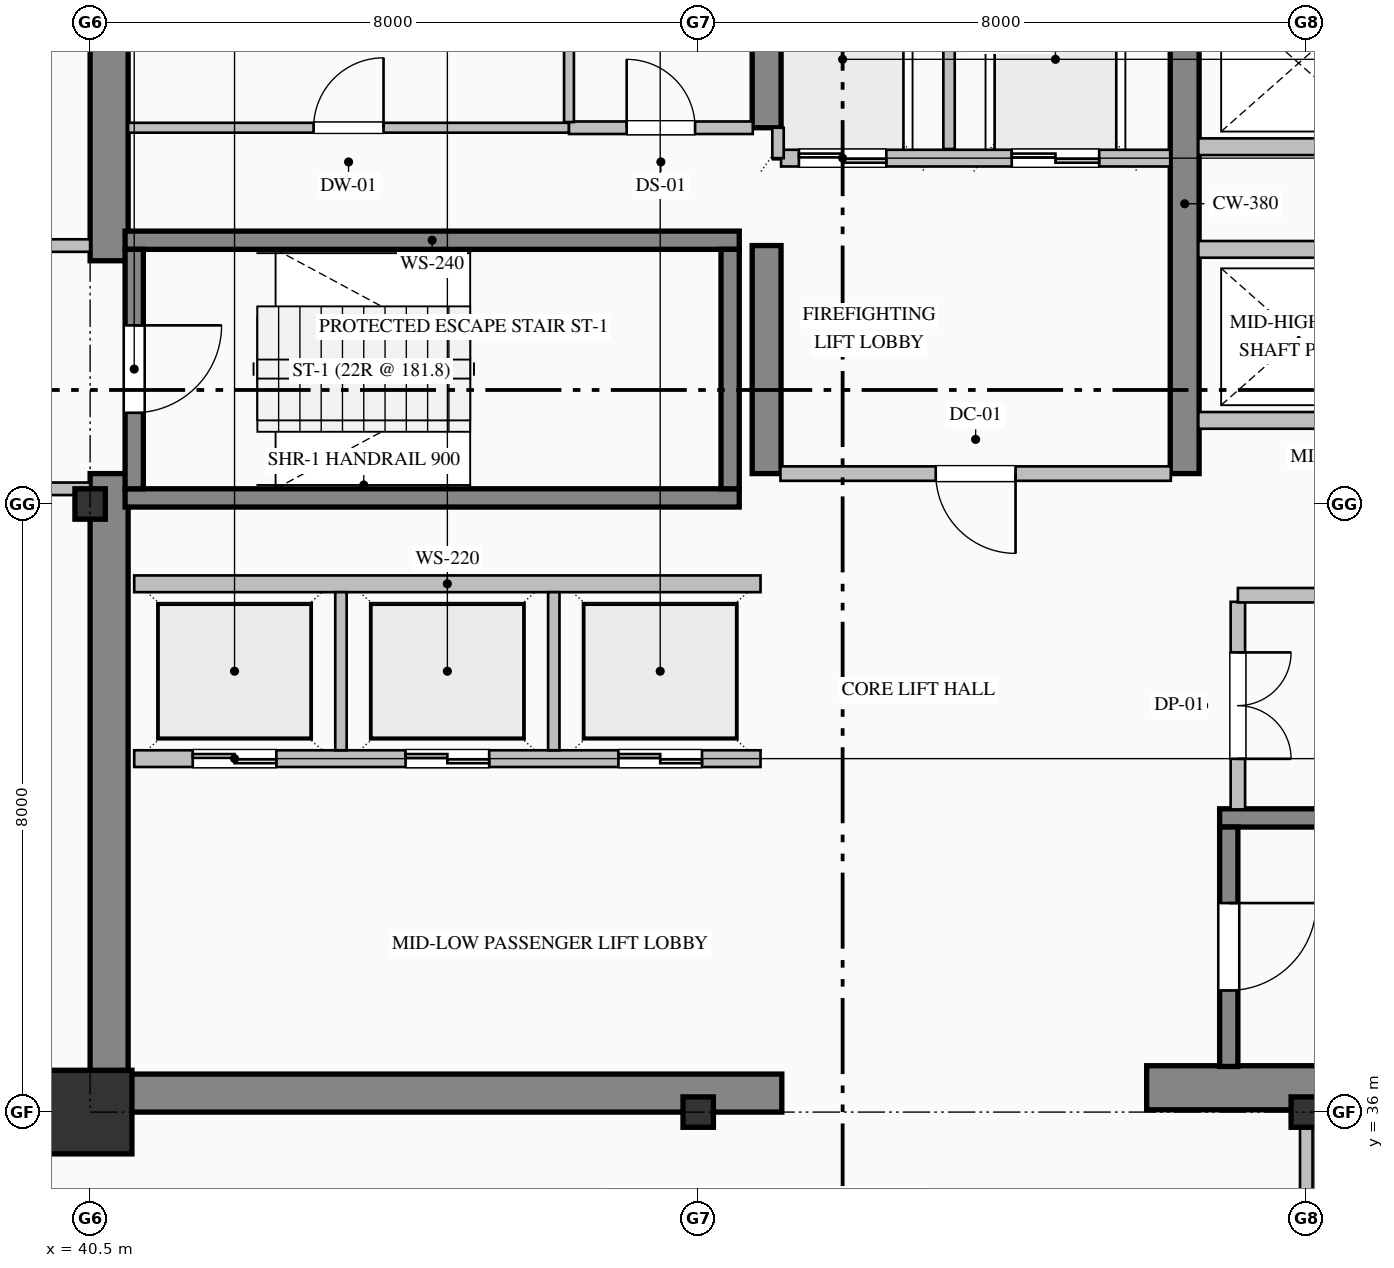
"""IFC4 building model, lengths in metres.
Left out: names, types, materials, properties, quantities, classifications, styles, units other than length and angle.
Written with IfcOpenShell. Run it as: python <this file> out.ifc"""

import sys

from ifc_helpers import new_model, si_unit, direction, frame, frame_2d, origin, origin_2d, place, context, subcontext, project, spatial, rectangle, hollow_rectangle, i_section, extrude, element, fill, save


model = new_model("IFC4")
c1 = context("Model", 3, precision=1e-05, world=origin(), true_north=direction((0.0, 1.0)))
c2 = subcontext(c1, "Body", "Model", "MODEL_VIEW")
j1 = project(units=[si_unit("LENGTHUNIT", "METRE"), si_unit("PLANEANGLEUNIT", "RADIAN")], contexts=[c1])
p1 = place(None, origin())
s1 = spatial("IfcSite", under=j1, at=p1, CompositionType="ELEMENT")
p2 = place(p1, origin())
s2 = spatial("IfcBuilding", under=s1, at=p2, CompositionType="ELEMENT")
p3 = place(p2, frame((0.0, 0.0, 127.0)))
s3 = spatial("IfcBuildingStorey", under=s2, at=p3, CompositionType="ELEMENT", Elevation=127.0)
p4 = place(p3, frame((40.75, 36.5, 0.0), z_axis=(0.0, 0.0, 1.0), x_axis=(0.0, 1.0, 0.0)))
e1 = element("IfcWall", 1, at=p4, inside=s3, PredefinedType="SHEAR", context=c2, shape_type="SweptSolid", body=[
    extrude(rectangle(XDim=7.9, YDim=0.5, at=frame_2d((3.95, 0.0))), origin(), (0.0, 0.0, 1.0), 3.765),
])
p5 = place(p3, frame((40.75, 47.2, 0.0), z_axis=(0.0, 0.0, 1.0), x_axis=(0.0, 1.0, 0.0)))
e2 = element("IfcWall", 2, at=p5, inside=s3, PredefinedType="SHEAR", context=c2, shape_type="SweptSolid", body=[
    extrude(rectangle(XDim=4.3, YDim=0.5, at=frame_2d((2.15, 0.0))), origin(), (0.0, 0.0, 1.0), 3.765),
])
p6 = place(p3, frame((40.5, 36.25, 0.0), z_axis=(0.0, 0.0, 1.0), x_axis=(1.0, 0.0, 0.0)))
e3 = element("IfcWall", 3, at=p6, inside=s3, PredefinedType="SHEAR", context=c2, shape_type="SweptSolid", body=[
    extrude(rectangle(XDim=9.1, YDim=0.5, at=frame_2d((4.55, 0.0))), origin(), (0.0, 0.0, 1.0), 3.765),
])
p7 = place(p3, frame((54.4, 36.32, 0.0), z_axis=(0.0, 0.0, 1.0), x_axis=(1.0, 0.0, 0.0)))
e4 = element("IfcWall", 4, at=p7, inside=s3, PredefinedType="SHEAR", context=c2, shape_type="SweptSolid", body=[
    extrude(rectangle(XDim=9.6, YDim=0.58, at=frame_2d((4.8, 0.0))), origin(), (0.0, 0.0, 1.0), 4.0),
])
p8 = place(p3, frame((49.4, 44.4, 0.0), z_axis=(0.0, 0.0, 1.0), x_axis=(0.0, 1.0, 0.0)))
e5 = element("IfcWall", 5, at=p8, inside=s3, PredefinedType="SHEAR", context=c2, shape_type="SweptSolid", body=[
    extrude(rectangle(XDim=3.0, YDim=0.38, at=frame_2d((1.5, 0.0))), origin(), (0.0, 0.0, 1.0), 3.765),
])
p9 = place(p3, frame((49.4, 48.95, 0.0), z_axis=(0.0, 0.0, 1.0), x_axis=(0.0, 1.0, 0.0)))
e6 = element("IfcWall", 6, at=p9, inside=s3, PredefinedType="SHEAR", context=c2, shape_type="SweptSolid", body=[
    extrude(rectangle(XDim=2.55, YDim=0.38, at=frame_2d((1.275, 0.0))), origin(), (0.0, 0.0, 1.0), 3.765),
])
p10 = place(p3, frame((54.9, 44.4, 0.0), z_axis=(0.0, 0.0, 1.0), x_axis=(0.0, 1.0, 0.0)))
e7 = element("IfcWall", 7, at=p10, inside=s3, PredefinedType="SHEAR", context=c2, shape_type="SweptSolid", body=[
    extrude(rectangle(XDim=7.1, YDim=0.38, at=frame_2d((3.55, 0.0))), origin(), (0.0, 0.0, 1.0), 3.765),
])
p11 = place(p3, frame((40.5, 36.0, 0.0), z_axis=(0.0, 0.0, 1.0), x_axis=(1.0, 0.0, 0.0)))
e8 = element("IfcColumn", 8, at=p11, inside=s3, PredefinedType="COLUMN", context=c2, shape_type="SweptSolid", body=[
    extrude(hollow_rectangle(XDim=1.1, YDim=1.1, WallThickness=0.04, at=origin_2d()), origin(), (0.0, 0.0, 1.0), 4.0),
])
for number, where, z_axis, x_axis in (
    (9, (40.5, 44.0, 0.0), (0.0, 0.0, 1.0), (1.0, 0.0, 0.0)),
    (10, (48.5, 36.0, 0.0), (0.0, 0.0, 1.0), (1.0, 0.0, 0.0)),
    (11, (56.5, 36.0, 0.0), (0.0, 0.0, 1.0), (1.0, 0.0, 0.0)),
):
    element("IfcColumn", number, at=place(p3, frame(where, z_axis=z_axis, x_axis=x_axis)), inside=s3, PredefinedType="COLUMN", context=c2, shape_type="SweptSolid", body=[
        extrude(i_section(OverallWidth=0.4, OverallDepth=0.4, WebThickness=0.013, FlangeThickness=0.021, FilletRadius=0.022, at=origin_2d()), origin(), (0.0, 0.0, 1.0), 4.0),
    ])
for number, where, z_axis, x_axis in (
    (12, (40.96, 47.47, 0.0), (0.0, 0.0, 1.0), (1.0, 0.0, 0.0)),
    (13, (49.04, 44.08, 0.0), (0.0, 0.0, 1.0), (-1.0, 0.0, 0.0)),
):
    element("IfcWall", number, at=place(p3, frame(where, z_axis=z_axis, x_axis=x_axis)), inside=s3, PredefinedType="SOLIDWALL", context=c2, shape_type="SweptSolid", body=[
        extrude(rectangle(XDim=8.08, YDim=0.24, at=frame_2d((4.04, 0.0))), origin(), (0.0, 0.0, 1.0), 4.0),
    ])
p12 = place(p3, frame((41.08, 47.35, 0.0), z_axis=(0.0, 0.0, 1.0), x_axis=(0.0, -1.0, 0.0)))
e14 = element("IfcWall", 14, at=p12, inside=s3, PredefinedType="SOLIDWALL", context=c2, shape_type="SweptSolid", body=[
    extrude(rectangle(XDim=3.15, YDim=0.24, at=frame_2d((1.575, 0.0))), origin(), (0.0, 0.0, 1.0), 4.0),
])
p13 = place(p12, frame((1.0, 0.0, 0.0)))
e15 = element("IfcOpeningElement", 15, at=p13, cuts=e14, PredefinedType="OPENING", context=c2, shape_type="SweptSolid", body=[
    extrude(rectangle(XDim=1.15, YDim=2.2, at=frame_2d((0.575, 1.1))), frame((0.0, 0.13, 0.0), z_axis=(0.0, -1.0, 0.0), x_axis=(1.0, 0.0, 0.0)), (0.0, 0.0, 1.0), 0.26),
])
p14 = place(p3, frame((48.92, 44.2, 0.0), z_axis=(0.0, 0.0, 1.0), x_axis=(0.0, 1.0, 0.0)))
e16 = element("IfcWall", 16, at=p14, inside=s3, PredefinedType="SOLIDWALL", context=c2, shape_type="SweptSolid", body=[
    extrude(rectangle(XDim=3.15, YDim=0.24, at=frame_2d((1.575, 0.0))), origin(), (0.0, 0.0, 1.0), 4.0),
])
p15 = place(p3, frame((55.36, 39.87, 0.0), z_axis=(0.0, 0.0, 1.0), x_axis=(1.0, 0.0, 0.0)))
e17 = element("IfcWall", 17, at=p15, inside=s3, PredefinedType="SOLIDWALL", context=c2, shape_type="SweptSolid", body=[
    extrude(rectangle(XDim=8.08, YDim=0.24, at=frame_2d((4.04, 0.0))), origin(), (0.0, 0.0, 1.0), 4.0),
])
p16 = place(p3, frame((55.48, 39.75, 0.0), z_axis=(0.0, 0.0, 1.0), x_axis=(0.0, -1.0, 0.0)))
e18 = element("IfcWall", 18, at=p16, inside=s3, PredefinedType="SOLIDWALL", context=c2, shape_type="SweptSolid", body=[
    extrude(rectangle(XDim=3.15, YDim=0.24, at=frame_2d((1.575, 0.0))), origin(), (0.0, 0.0, 1.0), 4.0),
])
p17 = place(p16, frame((1.0, 0.0, 0.0)))
e19 = element("IfcOpeningElement", 19, at=p17, cuts=e18, PredefinedType="OPENING", context=c2, shape_type="SweptSolid", body=[
    extrude(rectangle(XDim=1.15, YDim=2.2, at=frame_2d((0.575, 1.1))), frame((0.0, 0.13, 0.0), z_axis=(0.0, -1.0, 0.0), x_axis=(1.0, 0.0, 0.0)), (0.0, 0.0, 1.0), 0.26),
])
p18 = place(p3, frame((54.71, 48.55, 0.0), z_axis=(0.0, 0.0, 1.0), x_axis=(-1.0, 0.0, 0.0)))
e20 = element("IfcWall", 20, at=p18, inside=s3, PredefinedType="PARTITIONING", context=c2, shape_type="SweptSolid", body=[
    extrude(rectangle(XDim=5.12, YDim=0.22, at=frame_2d((2.56, 0.0))), origin(), (0.0, 0.0, 1.0), 3.765),
])
p19 = place(p18, frame((3.735, 0.0, 0.0)))
e21 = element("IfcOpeningElement", 21, at=p19, cuts=e20, PredefinedType="OPENING", context=c2, shape_type="SweptSolid", body=[
    extrude(rectangle(XDim=1.15, YDim=2.2, at=frame_2d((0.575, 1.1))), frame((0.0, 0.12, 0.0), z_axis=(0.0, -1.0, 0.0), x_axis=(1.0, 0.0, 0.0)), (0.0, 0.0, 1.0), 0.24),
])
p20 = place(p18, frame((0.935, 0.0, 0.0)))
e22 = element("IfcOpeningElement", 22, at=p20, cuts=e20, PredefinedType="OPENING", context=c2, shape_type="SweptSolid", body=[
    extrude(rectangle(XDim=1.15, YDim=2.2, at=frame_2d((0.575, 1.1))), frame((0.0, 0.12, 0.0), z_axis=(0.0, -1.0, 0.0), x_axis=(1.0, 0.0, 0.0)), (0.0, 0.0, 1.0), 0.24),
])
p21 = place(p3, frame((51.8, 48.67, 0.0), z_axis=(0.0, 0.0, 1.0), x_axis=(0.0, 1.0, 0.0)))
e23 = element("IfcWall", 23, at=p21, inside=s3, PredefinedType="PARTITIONING", context=c2, shape_type="SweptSolid", body=[
    extrude(rectangle(XDim=2.83, YDim=0.15, at=frame_2d((1.415, 0.0))), origin(), (0.0, 0.0, 1.0), 3.765),
])
p22 = place(p3, frame((49.55, 48.55, 0.0), z_axis=(0.0, 0.0, 1.0), x_axis=(0.0, 1.0, 0.0)))
e24 = element("IfcWall", 24, at=p22, inside=s3, PredefinedType="PARTITIONING", context=c2, shape_type="SweptSolid", body=[
    extrude(rectangle(XDim=0.4, YDim=0.15, at=frame_2d((0.2, 0.0))), origin(), (0.0, 0.0, 1.0), 3.765),
])
p23 = place(p3, frame((49.32, 40.65, 0.0), z_axis=(0.0, 0.0, 1.0), x_axis=(-1.0, 0.0, 0.0)))
e25 = element("IfcWall", 25, at=p23, inside=s3, PredefinedType="PARTITIONING", context=c2, shape_type="SweptSolid", body=[
    extrude(rectangle(XDim=8.24, YDim=0.22, at=frame_2d((4.12, 0.0))), origin(), (0.0, 0.0, 1.0), 3.765),
])
p24 = place(p23, frame((6.37, 0.0, 0.0)))
e26 = element("IfcOpeningElement", 26, at=p24, cuts=e25, PredefinedType="OPENING", context=c2, shape_type="SweptSolid", body=[
    extrude(rectangle(XDim=1.1, YDim=2.2, at=frame_2d((0.55, 1.1))), frame((0.0, 0.12, 0.0), z_axis=(0.0, -1.0, 0.0), x_axis=(1.0, 0.0, 0.0)), (0.0, 0.0, 1.0), 0.24),
])
p25 = place(p23, frame((3.57, 0.0, 0.0)))
e27 = element("IfcOpeningElement", 27, at=p25, cuts=e25, PredefinedType="OPENING", context=c2, shape_type="SweptSolid", body=[
    extrude(rectangle(XDim=1.1, YDim=2.2, at=frame_2d((0.55, 1.1))), frame((0.0, 0.12, 0.0), z_axis=(0.0, -1.0, 0.0), x_axis=(1.0, 0.0, 0.0)), (0.0, 0.0, 1.0), 0.24),
])
p26 = place(p23, frame((0.77, 0.0, 0.0)))
e28 = element("IfcOpeningElement", 28, at=p26, cuts=e25, PredefinedType="OPENING", context=c2, shape_type="SweptSolid", body=[
    extrude(rectangle(XDim=1.1, YDim=2.2, at=frame_2d((0.55, 1.1))), frame((0.0, 0.12, 0.0), z_axis=(0.0, -1.0, 0.0), x_axis=(1.0, 0.0, 0.0)), (0.0, 0.0, 1.0), 0.24),
])
p27 = place(p3, frame((41.08, 42.95, 0.0), z_axis=(0.0, 0.0, 1.0), x_axis=(1.0, 0.0, 0.0)))
e29 = element("IfcWall", 29, at=p27, inside=s3, PredefinedType="PARTITIONING", context=c2, shape_type="SweptSolid", body=[
    extrude(rectangle(XDim=8.24, YDim=0.22, at=frame_2d((4.12, 0.0))), origin(), (0.0, 0.0, 1.0), 3.765),
])
for number, where, z_axis, x_axis in (
    (30, (43.8, 40.76, 0.0), (0.0, 0.0, 1.0), (0.0, 1.0, 0.0)),
    (31, (46.6, 40.76, 0.0), (0.0, 0.0, 1.0), (0.0, 1.0, 0.0)),
):
    element("IfcWall", number, at=place(p3, frame(where, z_axis=z_axis, x_axis=x_axis)), inside=s3, PredefinedType="PARTITIONING", context=c2, shape_type="SweptSolid", body=[
        extrude(rectangle(XDim=2.08, YDim=0.15, at=frame_2d((1.04, 0.0))), origin(), (0.0, 0.0, 1.0), 3.765),
    ])
for number, where, z_axis, x_axis in (
    (32, (63.32, 45.1, 0.0), (0.0, 0.0, 1.0), (-1.0, 0.0, 0.0)),
    (33, (55.08, 47.35, 0.0), (0.0, 0.0, 1.0), (1.0, 0.0, 0.0)),
    (34, (63.32, 48.7, 0.0), (0.0, 0.0, 1.0), (-1.0, 0.0, 0.0)),
):
    element("IfcWall", number, at=place(p3, frame(where, z_axis=z_axis, x_axis=x_axis)), inside=s3, PredefinedType="PARTITIONING", context=c2, shape_type="SweptSolid", body=[
        extrude(rectangle(XDim=8.24, YDim=0.22, at=frame_2d((4.12, 0.0))), origin(), (0.0, 0.0, 1.0), 3.765),
    ])
p28 = place(p3, frame((37.8, 47.4, 0.0), z_axis=(0.0, 0.0, 1.0), x_axis=(1.0, 0.0, 0.0)))
e35 = element("IfcWall", 35, at=p28, inside=s3, PredefinedType="PARTITIONING", context=c2, shape_type="SweptSolid", body=[
    extrude(rectangle(XDim=2.7, YDim=0.165, at=frame_2d((1.35, 0.0))), origin(), (0.0, 0.0, 1.0), 3.765),
])
p29 = place(p28, frame((0.825, 0.0, 0.0)))
e36 = element("IfcOpeningElement", 36, at=p29, cuts=e35, PredefinedType="OPENING", context=c2, shape_type="SweptSolid", body=[
    extrude(rectangle(XDim=1.05, YDim=2.15, at=frame_2d((0.525, 1.075))), frame((0.0, 0.093, 0.0), z_axis=(0.0, -1.0, 0.0), x_axis=(1.0, 0.0, 0.0)), (0.0, 0.0, 1.0), 0.185),
])
p30 = place(p3, frame((40.5, 44.2, 0.0), z_axis=(0.0, 0.0, 1.0), x_axis=(-1.0, 0.0, 0.0)))
e37 = element("IfcWall", 37, at=p30, inside=s3, PredefinedType="PARTITIONING", context=c2, shape_type="SweptSolid", body=[
    extrude(rectangle(XDim=2.7, YDim=0.165, at=frame_2d((1.35, 0.0))), origin(), (0.0, 0.0, 1.0), 3.765),
])
p31 = place(p30, frame((0.825, 0.0, 0.0)))
e38 = element("IfcOpeningElement", 38, at=p31, cuts=e37, PredefinedType="OPENING", context=c2, shape_type="SweptSolid", body=[
    extrude(rectangle(XDim=1.05, YDim=2.15, at=frame_2d((0.525, 1.075))), frame((0.0, 0.093, 0.0), z_axis=(0.0, -1.0, 0.0), x_axis=(1.0, 0.0, 0.0)), (0.0, 0.0, 1.0), 0.185),
])
p32 = place(p3, frame((41.0, 48.95, 0.0), z_axis=(0.0, 0.0, 1.0), x_axis=(1.0, 0.0, 0.0)))
e39 = element("IfcWall", 39, at=p32, inside=s3, PredefinedType="PARTITIONING", context=c2, shape_type="SweptSolid", body=[
    extrude(rectangle(XDim=5.8, YDim=0.13, at=frame_2d((2.9, 0.0))), origin(), (0.0, 0.0, 1.0), 3.765),
])
p33 = place(p32, frame((2.44, 0.0, 0.0)))
e40 = element("IfcOpeningElement", 40, at=p33, cuts=e39, PredefinedType="OPENING", context=c2, shape_type="SweptSolid", body=[
    extrude(rectangle(XDim=0.92, YDim=2.15, at=frame_2d((0.46, 1.075))), frame((0.0, 0.075, 0.0), z_axis=(0.0, -1.0, 0.0), x_axis=(1.0, 0.0, 0.0)), (0.0, 0.0, 1.0), 0.15),
])
p34 = place(p3, frame((46.8, 48.95, 0.0), z_axis=(0.0, 0.0, 1.0), x_axis=(1.0, 0.0, 0.0)))
e41 = element("IfcWall", 41, at=p34, inside=s3, PredefinedType="PARTITIONING", context=c2, shape_type="SweptSolid", body=[
    extrude(rectangle(XDim=2.418, YDim=0.165, at=frame_2d((1.209, 0.0))), origin(), (0.0, 0.0, 1.0), 3.765),
])
p35 = place(p34, frame((0.759, 0.0, 0.0)))
e42 = element("IfcOpeningElement", 42, at=p35, cuts=e41, PredefinedType="OPENING", context=c2, shape_type="SweptSolid", body=[
    extrude(rectangle(XDim=0.9, YDim=2.15, at=frame_2d((0.45, 1.075))), frame((0.0, 0.093, 0.0), z_axis=(0.0, -1.0, 0.0), x_axis=(1.0, 0.0, 0.0)), (0.0, 0.0, 1.0), 0.185),
])
p36 = place(p3, frame((54.718, 44.4, 0.0), z_axis=(0.0, 0.0, 1.0), x_axis=(-1.0, 0.0, 0.0)))
e43 = element("IfcWall", 43, at=p36, inside=s3, PredefinedType="PARTITIONING", context=c2, shape_type="SweptSolid", body=[
    extrude(rectangle(XDim=5.136, YDim=0.19, at=frame_2d((2.568, 0.0))), origin(), (0.0, 0.0, 1.0), 3.765),
])
p37 = place(p36, frame((2.043, 0.0, 0.0)))
e44 = element("IfcOpeningElement", 44, at=p37, cuts=e43, PredefinedType="OPENING", context=c2, shape_type="SweptSolid", body=[
    extrude(rectangle(XDim=1.05, YDim=2.15, at=frame_2d((0.525, 1.075))), frame((0.0, 0.105, 0.0), z_axis=(0.0, -1.0, 0.0), x_axis=(1.0, 0.0, 0.0)), (0.0, 0.0, 1.0), 0.21),
])
p38 = place(p3, frame((55.6, 42.713, 0.0), z_axis=(0.0, 0.0, 1.0), x_axis=(0.0, -1.0, 0.0)))
e45 = element("IfcWall", 45, at=p38, inside=s3, PredefinedType="PARTITIONING", context=c2, shape_type="SweptSolid", body=[
    extrude(rectangle(XDim=2.731, YDim=0.19, at=frame_2d((1.365, 0.0))), origin(), (0.0, 0.0, 1.0), 3.765),
])
p39 = place(p38, frame((0.666, 0.0, 0.0)))
e46 = element("IfcOpeningElement", 46, at=p39, cuts=e45, PredefinedType="OPENING", context=c2, shape_type="SweptSolid", body=[
    extrude(rectangle(XDim=1.4, YDim=2.25, at=frame_2d((0.7, 1.125))), frame((0.0, 0.105, 0.0), z_axis=(0.0, -1.0, 0.0), x_axis=(1.0, 0.0, 0.0)), (0.0, 0.0, 1.0), 0.21),
])
p40 = place(p3, frame((58.2, 42.8, 0.0), z_axis=(0.0, 0.0, 1.0), x_axis=(-1.0, 0.0, 0.0)))
e47 = element("IfcWall", 47, at=p40, inside=s3, PredefinedType="PARTITIONING", context=c2, shape_type="SweptSolid", body=[
    extrude(rectangle(XDim=2.6, YDim=0.19, at=frame_2d((1.3, 0.0))), origin(), (0.0, 0.0, 1.0), 3.765),
])
p41 = place(p3, frame((46.8, 51.5, 0.0), z_axis=(0.0, 0.0, 1.0), x_axis=(0.0, -1.0, 0.0)))
e48 = element("IfcWall", 48, at=p41, inside=s3, PredefinedType="PARTITIONING", context=c2, shape_type="SweptSolid", body=[
    extrude(rectangle(XDim=2.476, YDim=0.13, at=frame_2d((1.238, 0.0))), origin(), (0.0, 0.0, 1.0), 3.765),
])
p42 = place(p3, frame((56.5, 36.0, 0.0), z_axis=(0.0, 0.0, 1.0), x_axis=(0.0, -1.0, 0.0)))
e49 = element("IfcWall", 49, at=p42, inside=s3, PredefinedType="PARTITIONING", context=c2, shape_type="SweptSolid", body=[
    extrude(rectangle(XDim=2.325, YDim=0.165, at=frame_2d((1.163, 0.0))), origin(), (0.0, 0.0, 1.0), 3.157),
])
p43 = place(p13, origin())
e50 = element("IfcDoor", 50, at=p43, inside=s3, OperationType="SINGLE_SWING_LEFT", PredefinedType="DOOR", context=c2, shape_type="SweptSolid", body=[
    extrude(rectangle(XDim=1.15, YDim=2.2, at=frame_2d((0.575, 1.1))), frame((0.0, 0.025, 0.0), z_axis=(0.0, -1.0, 0.0), x_axis=(1.0, 0.0, 0.0)), (0.0, 0.0, 1.0), 0.05),
])
fill(e15, e50)
p44 = place(p17, origin())
e51 = element("IfcDoor", 51, at=p44, inside=s3, OperationType="SINGLE_SWING_LEFT", PredefinedType="DOOR", context=c2, shape_type="SweptSolid", body=[
    extrude(rectangle(XDim=1.15, YDim=2.2, at=frame_2d((0.575, 1.1))), frame((0.0, 0.025, 0.0), z_axis=(0.0, -1.0, 0.0), x_axis=(1.0, 0.0, 0.0)), (0.0, 0.0, 1.0), 0.05),
])
fill(e19, e51)
p45 = place(p19, origin())
e52 = element("IfcDoor", 52, at=p45, inside=s3, OperationType="DOUBLE_DOOR_SLIDING", PredefinedType="DOOR", context=c2, shape_type="SweptSolid", body=[
    extrude(rectangle(XDim=1.15, YDim=2.2, at=frame_2d((0.575, 1.1))), frame((0.0, 0.025, 0.0), z_axis=(0.0, -1.0, 0.0), x_axis=(1.0, 0.0, 0.0)), (0.0, 0.0, 1.0), 0.05),
])
fill(e21, e52)
p46 = place(p20, origin())
e53 = element("IfcDoor", 53, at=p46, inside=s3, OperationType="DOUBLE_DOOR_SLIDING", PredefinedType="DOOR", context=c2, shape_type="SweptSolid", body=[
    extrude(rectangle(XDim=1.15, YDim=2.2, at=frame_2d((0.575, 1.1))), frame((0.0, 0.025, 0.0), z_axis=(0.0, -1.0, 0.0), x_axis=(1.0, 0.0, 0.0)), (0.0, 0.0, 1.0), 0.05),
])
fill(e22, e53)
p47 = place(p24, origin())
e54 = element("IfcDoor", 54, at=p47, inside=s3, OperationType="DOUBLE_DOOR_SLIDING", PredefinedType="DOOR", context=c2, shape_type="SweptSolid", body=[
    extrude(rectangle(XDim=1.1, YDim=2.2, at=frame_2d((0.55, 1.1))), frame((0.0, 0.025, 0.0), z_axis=(0.0, -1.0, 0.0), x_axis=(1.0, 0.0, 0.0)), (0.0, 0.0, 1.0), 0.05),
])
fill(e26, e54)
p48 = place(p25, origin())
e55 = element("IfcDoor", 55, at=p48, inside=s3, OperationType="DOUBLE_DOOR_SLIDING", PredefinedType="DOOR", context=c2, shape_type="SweptSolid", body=[
    extrude(rectangle(XDim=1.1, YDim=2.2, at=frame_2d((0.55, 1.1))), frame((0.0, 0.025, 0.0), z_axis=(0.0, -1.0, 0.0), x_axis=(1.0, 0.0, 0.0)), (0.0, 0.0, 1.0), 0.05),
])
fill(e27, e55)
p49 = place(p26, origin())
e56 = element("IfcDoor", 56, at=p49, inside=s3, OperationType="DOUBLE_DOOR_SLIDING", PredefinedType="DOOR", context=c2, shape_type="SweptSolid", body=[
    extrude(rectangle(XDim=1.1, YDim=2.2, at=frame_2d((0.55, 1.1))), frame((0.0, 0.025, 0.0), z_axis=(0.0, -1.0, 0.0), x_axis=(1.0, 0.0, 0.0)), (0.0, 0.0, 1.0), 0.05),
])
fill(e28, e56)
p50 = place(p37, origin())
e57 = element("IfcDoor", 57, at=p50, inside=s3, OperationType="SINGLE_SWING_LEFT", PredefinedType="DOOR", context=c2, shape_type="SweptSolid", body=[
    extrude(rectangle(XDim=1.05, YDim=2.15, at=frame_2d((0.525, 1.075))), frame((0.0, 0.025, 0.0), z_axis=(0.0, -1.0, 0.0), x_axis=(1.0, 0.0, 0.0)), (0.0, 0.0, 1.0), 0.05),
])
fill(e44, e57)
p51 = place(p33, origin())
e58 = element("IfcDoor", 58, at=p51, inside=s3, OperationType="SINGLE_SWING_RIGHT", PredefinedType="DOOR", context=c2, shape_type="SweptSolid", body=[
    extrude(rectangle(XDim=0.92, YDim=2.15, at=frame_2d((0.46, 1.075))), frame((0.0, 0.025, 0.0), z_axis=(0.0, -1.0, 0.0), x_axis=(1.0, 0.0, 0.0)), (0.0, 0.0, 1.0), 0.05),
])
fill(e40, e58)
p52 = place(p35, origin())
e59 = element("IfcDoor", 59, at=p52, inside=s3, OperationType="SINGLE_SWING_LEFT", PredefinedType="DOOR", context=c2, shape_type="SweptSolid", body=[
    extrude(rectangle(XDim=0.9, YDim=2.15, at=frame_2d((0.45, 1.075))), frame((0.0, 0.025, 0.0), z_axis=(0.0, -1.0, 0.0), x_axis=(1.0, 0.0, 0.0)), (0.0, 0.0, 1.0), 0.05),
])
fill(e42, e59)
p53 = place(p39, origin())
e60 = element("IfcDoor", 60, at=p53, inside=s3, OperationType="DOUBLE_DOOR_SINGLE_SWING", PredefinedType="DOOR", context=c2, shape_type="SweptSolid", body=[
    extrude(rectangle(XDim=1.4, YDim=2.25, at=frame_2d((0.7, 1.125))), frame((0.0, 0.025, 0.0), z_axis=(0.0, -1.0, 0.0), x_axis=(1.0, 0.0, 0.0)), (0.0, 0.0, 1.0), 0.05),
])
fill(e46, e60)
save(model, sys.argv[1])
